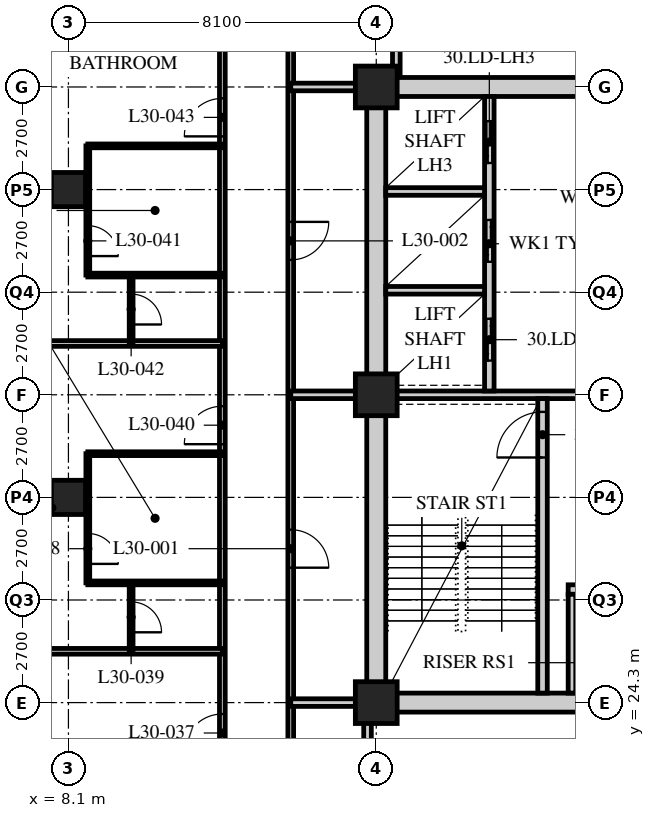
"""IFC4 building model, lengths in metres.
Left out: names, types, materials, properties, quantities, classifications, styles, units other than length and angle.
Written with IfcOpenShell. Run it as: python <this file> out.ifc"""

import sys

from ifc_helpers import new_model, si_unit, direction, frame, frame_2d, origin, origin_2d, place, context, subcontext, project, spatial, rectangle, hollow_rectangle, extrude, element, fill, save


model = new_model("IFC4")
c1 = context("Model", 3, precision=1e-05, world=origin(), true_north=direction((0.0, 1.0)))
c2 = subcontext(c1, "Body", "Model", "MODEL_VIEW")
j1 = project(units=[si_unit("LENGTHUNIT", "METRE"), si_unit("PLANEANGLEUNIT", "RADIAN")], contexts=[c1])
p1 = place(None, origin())
s1 = spatial("IfcSite", under=j1, at=p1, CompositionType="ELEMENT")
p2 = place(p1, origin())
s2 = spatial("IfcBuilding", under=s1, at=p2, CompositionType="ELEMENT")
p3 = place(p2, frame((0.0, 0.0, 120.4)))
s3 = spatial("IfcBuildingStorey", under=s2, at=p3, CompositionType="ELEMENT", Elevation=120.4)
for number, where, z_axis, x_axis in (
    (1, (8.1, 29.7, 0.0), (0.0, 0.0, 1.0), (1.0, 0.0, 0.0)),
    (2, (8.1, 37.8, 0.0), (0.0, 0.0, 1.0), (1.0, 0.0, 0.0)),
):
    element("IfcColumn", number, at=place(p3, frame(where, z_axis=z_axis, x_axis=x_axis)), inside=s3, PredefinedType="COLUMN", context=c2, shape_type="SweptSolid", body=[
        extrude(hollow_rectangle(XDim=0.9, YDim=0.9, WallThickness=0.09, at=origin_2d()), origin(), (0.0, 0.0, 1.0), 3.4),
    ])
for number, where, z_axis, x_axis in (
    (3, (16.2, 24.3, 0.0), (0.0, 0.0, 1.0), (1.0, 0.0, 0.0)),
    (4, (16.2, 32.4, 0.0), (0.0, 0.0, 1.0), (1.0, 0.0, 0.0)),
    (5, (16.2, 40.5, 0.0), (0.0, 0.0, 1.0), (1.0, 0.0, 0.0)),
):
    element("IfcColumn", number, at=place(p3, frame(where, z_axis=z_axis, x_axis=x_axis)), inside=s3, PredefinedType="COLUMN", context=c2, shape_type="SweptSolid", body=[
        extrude(hollow_rectangle(XDim=1.1, YDim=1.1, WallThickness=0.1, at=origin_2d()), origin(), (0.0, 0.0, 1.0), 3.4),
    ])
p4 = place(p3, frame((12.15, 17.55, 0.0), z_axis=(0.0, 0.0, 1.0), x_axis=(0.0, 1.0, 0.0)))
e6 = element("IfcWall", 6, at=p4, inside=s3, PredefinedType="PARTITIONING", context=c2, shape_type="SweptSolid", body=[
    extrude(rectangle(XDim=28.35, YDim=0.15, at=frame_2d((14.175, 0.0))), origin(), (0.0, 0.0, 1.0), 3.19),
])
p5 = place(p4, frame((5.45, 0.0, 0.0)))
e7 = element("IfcOpeningElement", 7, at=p5, cuts=e6, PredefinedType="OPENING", context=c2, shape_type="SweptSolid", body=[
    extrude(rectangle(XDim=1.0, YDim=2.1, at=frame_2d((0.5, 1.05))), frame((0.0, 0.085, 0.0), z_axis=(0.0, -1.0, 0.0), x_axis=(1.0, 0.0, 0.0)), (0.0, 0.0, 1.0), 0.17),
])
p6 = place(p4, frame((13.55, 0.0, 0.0)))
e8 = element("IfcOpeningElement", 8, at=p6, cuts=e6, PredefinedType="OPENING", context=c2, shape_type="SweptSolid", body=[
    extrude(rectangle(XDim=1.0, YDim=2.1, at=frame_2d((0.5, 1.05))), frame((0.0, 0.085, 0.0), z_axis=(0.0, -1.0, 0.0), x_axis=(1.0, 0.0, 0.0)), (0.0, 0.0, 1.0), 0.17),
])
p7 = place(p4, frame((21.65, 0.0, 0.0)))
e9 = element("IfcOpeningElement", 9, at=p7, cuts=e6, PredefinedType="OPENING", context=c2, shape_type="SweptSolid", body=[
    extrude(rectangle(XDim=1.0, YDim=2.1, at=frame_2d((0.5, 1.05))), frame((0.0, 0.085, 0.0), z_axis=(0.0, -1.0, 0.0), x_axis=(1.0, 0.0, 0.0)), (0.0, 0.0, 1.0), 0.17),
])
p8 = place(p4, frame((26.75, 0.0, 0.0)))
e10 = element("IfcOpeningElement", 10, at=p8, cuts=e6, PredefinedType="OPENING", context=c2, shape_type="SweptSolid", body=[
    extrude(rectangle(XDim=1.0, YDim=2.1, at=frame_2d((0.5, 1.05))), frame((0.0, 0.085, 0.0), z_axis=(0.0, -1.0, 0.0), x_axis=(1.0, 0.0, 0.0)), (0.0, 0.0, 1.0), 0.17),
])
p9 = place(p3, frame((13.95, 44.1, 0.0), z_axis=(0.0, 0.0, 1.0), x_axis=(0.0, -1.0, 0.0)))
e11 = element("IfcWall", 11, at=p9, inside=s3, PredefinedType="PARTITIONING", context=c2, shape_type="SweptSolid", body=[
    extrude(rectangle(XDim=24.75, YDim=0.15, at=frame_2d((12.375, 0.0))), origin(), (0.0, 0.0, 1.0), 3.19),
])
p10 = place(p9, frame((15.25, 0.0, 0.0)))
e12 = element("IfcOpeningElement", 12, at=p10, cuts=e11, PredefinedType="OPENING", context=c2, shape_type="SweptSolid", body=[
    extrude(rectangle(XDim=1.0, YDim=2.1, at=frame_2d((0.5, 1.05))), frame((0.0, 0.085, 0.0), z_axis=(0.0, -1.0, 0.0), x_axis=(1.0, 0.0, 0.0)), (0.0, 0.0, 1.0), 0.17),
])
p11 = place(p9, frame((7.15, 0.0, 0.0)))
e13 = element("IfcOpeningElement", 13, at=p11, cuts=e11, PredefinedType="OPENING", context=c2, shape_type="SweptSolid", body=[
    extrude(rectangle(XDim=1.0, YDim=2.1, at=frame_2d((0.5, 1.05))), frame((0.0, 0.085, 0.0), z_axis=(0.0, -1.0, 0.0), x_axis=(1.0, 0.0, 0.0)), (0.0, 0.0, 1.0), 0.17),
])
p12 = place(p3, frame((13.95, 32.4, 0.0), z_axis=(0.0, 0.0, 1.0), x_axis=(1.0, 0.0, 0.0)))
e14 = element("IfcWall", 14, at=p12, inside=s3, PredefinedType="SOLIDWALL", context=c2, shape_type="SweptSolid", body=[
    extrude(rectangle(XDim=2.25, YDim=0.2, at=frame_2d((1.125, 0.0))), origin(), (0.0, 0.0, 1.0), 3.19),
])
p13 = place(p3, frame((15.97, 19.35, 0.0), z_axis=(0.0, 0.0, 1.0), x_axis=(0.0, 1.0, 0.0)))
e15 = element("IfcWall", 15, at=p13, inside=s3, PredefinedType="SOLIDWALL", context=c2, shape_type="SweptSolid", body=[
    extrude(rectangle(XDim=4.95, YDim=0.2, at=frame_2d((2.475, 0.0))), origin(), (0.0, 0.0, 1.0), 2.49),
])
p14 = place(p3, frame((16.728, 44.1, 0.0), z_axis=(0.0, 0.0, 1.0), x_axis=(0.0, -1.0, 0.0)))
e16 = element("IfcWall", 16, at=p14, inside=s3, PredefinedType="SOLIDWALL", context=c2, shape_type="SweptSolid", body=[
    extrude(rectangle(XDim=3.6, YDim=0.2, at=frame_2d((1.8, 0.0))), origin(), (0.0, 0.0, 1.0), 3.19),
])
for number, where, z_axis, x_axis in (
    (17, (13.95, 24.3, 0.0), (0.0, 0.0, 1.0), (1.0, 0.0, 0.0)),
    (18, (13.95, 40.5, 0.0), (0.0, 0.0, 1.0), (1.0, 0.0, 0.0)),
):
    element("IfcWall", number, at=place(p3, frame(where, z_axis=z_axis, x_axis=x_axis)), inside=s3, PredefinedType="SOLIDWALL", context=c2, shape_type="SweptSolid", body=[
        extrude(rectangle(XDim=2.25, YDim=0.2, at=frame_2d((1.125, 0.0))), origin(), (0.0, 0.0, 1.0), 3.19),
    ])
p15 = place(p3, frame((12.15, 25.65, 0.0), z_axis=(0.0, 0.0, 1.0), x_axis=(-1.0, 0.0, 0.0)))
e19 = element("IfcWall", 19, at=p15, inside=s3, PredefinedType="PARTITIONING", context=c2, shape_type="SweptSolid", body=[
    extrude(rectangle(XDim=11.85, YDim=0.15, at=frame_2d((5.925, 0.0))), origin(), (0.0, 0.0, 1.0), 3.19),
])
p16 = place(p3, frame((8.61, 27.45, 0.0), z_axis=(0.0, 0.0, 1.0), x_axis=(0.0, 1.0, 0.0)))
e20 = element("IfcWall", 20, at=p16, inside=s3, PredefinedType="PARTITIONING", context=c2, shape_type="SweptSolid", body=[
    extrude(rectangle(XDim=3.4, YDim=0.1, at=frame_2d((1.7, 0.0))), origin(), (0.0, 0.0, 1.0), 3.19),
])
p17 = place(p16, frame((0.5, 0.0, 0.0)))
e21 = element("IfcOpeningElement", 21, at=p17, cuts=e20, PredefinedType="OPENING", context=c2, shape_type="SweptSolid", body=[
    extrude(rectangle(XDim=0.8, YDim=2.1, at=frame_2d((0.4, 1.05))), frame((0.0, 0.06, 0.0), z_axis=(0.0, -1.0, 0.0), x_axis=(1.0, 0.0, 0.0)), (0.0, 0.0, 1.0), 0.12),
])
p18 = place(p3, frame((9.75, 25.65, 0.0), z_axis=(0.0, 0.0, 1.0), x_axis=(0.0, 1.0, 0.0)))
e22 = element("IfcWall", 22, at=p18, inside=s3, PredefinedType="PARTITIONING", context=c2, shape_type="SweptSolid", body=[
    extrude(rectangle(XDim=1.8, YDim=0.1, at=frame_2d((0.9, 0.0))), origin(), (0.0, 0.0, 1.0), 3.19),
])
p19 = place(p18, frame((0.5, 0.0, 0.0)))
e23 = element("IfcOpeningElement", 23, at=p19, cuts=e22, PredefinedType="OPENING", context=c2, shape_type="SweptSolid", body=[
    extrude(rectangle(XDim=0.8, YDim=2.1, at=frame_2d((0.4, 1.05))), frame((0.0, 0.06, 0.0), z_axis=(0.0, -1.0, 0.0), x_axis=(1.0, 0.0, 0.0)), (0.0, 0.0, 1.0), 0.12),
])
for number, where, z_axis, x_axis in (
    (24, (12.15, 27.45, 0.0), (0.0, 0.0, 1.0), (-1.0, 0.0, 0.0)),
    (25, (12.15, 30.85, 0.0), (0.0, 0.0, 1.0), (-1.0, 0.0, 0.0)),
):
    element("IfcWall", number, at=place(p3, frame(where, z_axis=z_axis, x_axis=x_axis)), inside=s3, PredefinedType="PARTITIONING", context=c2, shape_type="SweptSolid", body=[
        extrude(rectangle(XDim=3.54, YDim=0.1, at=frame_2d((1.77, 0.0))), origin(), (0.0, 0.0, 1.0), 3.19),
    ])
p20 = place(p3, frame((12.15, 33.75, 0.0), z_axis=(0.0, 0.0, 1.0), x_axis=(-1.0, 0.0, 0.0)))
e26 = element("IfcWall", 26, at=p20, inside=s3, PredefinedType="PARTITIONING", context=c2, shape_type="SweptSolid", body=[
    extrude(rectangle(XDim=11.85, YDim=0.15, at=frame_2d((5.925, 0.0))), origin(), (0.0, 0.0, 1.0), 3.19),
])
p21 = place(p3, frame((8.61, 35.55, 0.0), z_axis=(0.0, 0.0, 1.0), x_axis=(0.0, 1.0, 0.0)))
e27 = element("IfcWall", 27, at=p21, inside=s3, PredefinedType="PARTITIONING", context=c2, shape_type="SweptSolid", body=[
    extrude(rectangle(XDim=3.4, YDim=0.1, at=frame_2d((1.7, 0.0))), origin(), (0.0, 0.0, 1.0), 3.19),
])
p22 = place(p21, frame((0.5, 0.0, 0.0)))
e28 = element("IfcOpeningElement", 28, at=p22, cuts=e27, PredefinedType="OPENING", context=c2, shape_type="SweptSolid", body=[
    extrude(rectangle(XDim=0.8, YDim=2.1, at=frame_2d((0.4, 1.05))), frame((0.0, 0.06, 0.0), z_axis=(0.0, -1.0, 0.0), x_axis=(1.0, 0.0, 0.0)), (0.0, 0.0, 1.0), 0.12),
])
p23 = place(p3, frame((9.75, 33.75, 0.0), z_axis=(0.0, 0.0, 1.0), x_axis=(0.0, 1.0, 0.0)))
e29 = element("IfcWall", 29, at=p23, inside=s3, PredefinedType="PARTITIONING", context=c2, shape_type="SweptSolid", body=[
    extrude(rectangle(XDim=1.8, YDim=0.1, at=frame_2d((0.9, 0.0))), origin(), (0.0, 0.0, 1.0), 3.19),
])
p24 = place(p23, frame((0.5, 0.0, 0.0)))
e30 = element("IfcOpeningElement", 30, at=p24, cuts=e29, PredefinedType="OPENING", context=c2, shape_type="SweptSolid", body=[
    extrude(rectangle(XDim=0.8, YDim=2.1, at=frame_2d((0.4, 1.05))), frame((0.0, 0.06, 0.0), z_axis=(0.0, -1.0, 0.0), x_axis=(1.0, 0.0, 0.0)), (0.0, 0.0, 1.0), 0.12),
])
for number, where, z_axis, x_axis in (
    (31, (12.15, 35.55, 0.0), (0.0, 0.0, 1.0), (-1.0, 0.0, 0.0)),
    (32, (12.15, 38.95, 0.0), (0.0, 0.0, 1.0), (-1.0, 0.0, 0.0)),
):
    element("IfcWall", number, at=place(p3, frame(where, z_axis=z_axis, x_axis=x_axis)), inside=s3, PredefinedType="PARTITIONING", context=c2, shape_type="SweptSolid", body=[
        extrude(rectangle(XDim=3.54, YDim=0.1, at=frame_2d((1.77, 0.0))), origin(), (0.0, 0.0, 1.0), 3.19),
    ])
p25 = place(p3, frame((15.95, 24.3, 0.0), z_axis=(0.0, 0.0, 1.0), x_axis=(1.0, 0.0, 0.0)))
e33 = element("IfcWall", 33, at=p25, inside=s3, PredefinedType="SOLIDWALL", context=c2, shape_type="SweptSolid", body=[
    extrude(rectangle(XDim=24.8, YDim=0.5, at=frame_2d((12.4, 0.0))), origin(), (0.0, 0.0, 1.0), 2.54),
])
p26 = place(p25, frame((11.5, 0.0, 0.0)))
e34 = element("IfcOpeningElement", 34, at=p26, cuts=e33, PredefinedType="OPENING", context=c2, shape_type="SweptSolid", body=[
    extrude(rectangle(XDim=1.8, YDim=2.4, at=frame_2d((0.9, 1.2))), frame((0.0, 0.26, 0.0), z_axis=(0.0, -1.0, 0.0), x_axis=(1.0, 0.0, 0.0)), (0.0, 0.0, 1.0), 0.52),
])
p27 = place(p3, frame((15.95, 40.5, 0.0), z_axis=(0.0, 0.0, 1.0), x_axis=(1.0, 0.0, 0.0)))
e35 = element("IfcWall", 35, at=p27, inside=s3, PredefinedType="SOLIDWALL", context=c2, shape_type="SweptSolid", body=[
    extrude(rectangle(XDim=24.8, YDim=0.5, at=frame_2d((12.4, 0.0))), origin(), (0.0, 0.0, 1.0), 2.54),
])
p28 = place(p27, frame((11.5, 0.0, 0.0)))
e36 = element("IfcOpeningElement", 36, at=p28, cuts=e35, PredefinedType="OPENING", context=c2, shape_type="SweptSolid", body=[
    extrude(rectangle(XDim=1.8, YDim=2.4, at=frame_2d((0.9, 1.2))), frame((0.0, 0.26, 0.0), z_axis=(0.0, -1.0, 0.0), x_axis=(1.0, 0.0, 0.0)), (0.0, 0.0, 1.0), 0.52),
])
p29 = place(p3, frame((16.2, 24.55, 0.0), z_axis=(0.0, 0.0, 1.0), x_axis=(0.0, 1.0, 0.0)))
e37 = element("IfcWall", 37, at=p29, inside=s3, PredefinedType="SOLIDWALL", context=c2, shape_type="SweptSolid", body=[
    extrude(rectangle(XDim=15.7, YDim=0.5, at=frame_2d((7.85, 0.0))), origin(), (0.0, 0.0, 1.0), 2.578),
])
p30 = place(p3, frame((16.45, 32.4, 0.0), z_axis=(0.0, 0.0, 1.0), x_axis=(1.0, 0.0, 0.0)))
e38 = element("IfcWall", 38, at=p30, inside=s3, PredefinedType="SOLIDWALL", context=c2, shape_type="SweptSolid", body=[
    extrude(rectangle(XDim=7.95, YDim=0.2, at=frame_2d((3.975, 0.0))), origin(), (0.0, 0.0, 1.0), 2.578),
])
p31 = place(p3, frame((20.575, 24.55, 0.0), z_axis=(0.0, 0.0, 1.0), x_axis=(0.0, 1.0, 0.0)))
e39 = element("IfcWall", 39, at=p31, inside=s3, PredefinedType="SOLIDWALL", context=c2, shape_type="SweptSolid", body=[
    extrude(rectangle(XDim=7.75, YDim=0.25, at=frame_2d((3.875, 0.0))), origin(), (0.0, 0.0, 1.0), 3.19),
])
p32 = place(p31, frame((6.2, 0.0, 0.0)))
e40 = element("IfcOpeningElement", 40, at=p32, cuts=e39, PredefinedType="OPENING", context=c2, shape_type="SweptSolid", body=[
    extrude(rectangle(XDim=1.2, YDim=2.1, at=frame_2d((0.6, 1.05))), frame((0.0, 0.135, 0.0), z_axis=(0.0, -1.0, 0.0), x_axis=(1.0, 0.0, 0.0)), (0.0, 0.0, 1.0), 0.27),
])
p33 = place(p3, frame((21.25, 27.275, 0.0), z_axis=(0.0, 0.0, 1.0), x_axis=(1.0, 0.0, 0.0)))
e41 = element("IfcWall", 41, at=p33, inside=s3, PredefinedType="SOLIDWALL", context=c2, shape_type="SweptSolid", body=[
    extrude(rectangle(XDim=2.95, YDim=0.25, at=frame_2d((1.475, 0.0))), origin(), (0.0, 0.0, 1.0), 3.19),
])
p34 = place(p33, frame((0.95, 0.0, 0.0)))
e42 = element("IfcOpeningElement", 42, at=p34, cuts=e41, PredefinedType="OPENING", context=c2, shape_type="SweptSolid", body=[
    extrude(rectangle(XDim=1.1, YDim=2.4, at=frame_2d((0.55, 1.2))), frame((0.0, 0.135, 0.0), z_axis=(0.0, -1.0, 0.0), x_axis=(1.0, 0.0, 0.0)), (0.0, 0.0, 1.0), 0.27),
])
p35 = place(p3, frame((21.35, 24.55, 0.0), z_axis=(0.0, 0.0, 1.0), x_axis=(0.0, 1.0, 0.0)))
e43 = element("IfcWall", 43, at=p35, inside=s3, PredefinedType="SOLIDWALL", context=c2, shape_type="SweptSolid", body=[
    extrude(rectangle(XDim=2.6, YDim=0.2, at=frame_2d((1.3, 0.0))), origin(), (0.0, 0.0, 1.0), 3.19),
])
p36 = place(p3, frame((19.175, 32.5, 0.0), z_axis=(0.0, 0.0, 1.0), x_axis=(0.0, 1.0, 0.0)))
e44 = element("IfcWall", 44, at=p36, inside=s3, PredefinedType="SOLIDWALL", context=c2, shape_type="SweptSolid", body=[
    extrude(rectangle(XDim=7.75, YDim=0.25, at=frame_2d((3.875, 0.0))), origin(), (0.0, 0.0, 1.0), 3.19),
])
p37 = place(p36, frame((0.8, 0.0, 0.0)))
e45 = element("IfcOpeningElement", 45, at=p37, cuts=e44, PredefinedType="OPENING", context=c2, shape_type="SweptSolid", body=[
    extrude(rectangle(XDim=1.1, YDim=2.4, at=frame_2d((0.55, 1.2))), frame((0.0, 0.135, 0.0), z_axis=(0.0, -1.0, 0.0), x_axis=(1.0, 0.0, 0.0)), (0.0, 0.0, 1.0), 0.27),
])
p38 = place(p36, frame((3.4, 0.0, 0.0)))
e46 = element("IfcOpeningElement", 46, at=p38, cuts=e44, PredefinedType="OPENING", context=c2, shape_type="SweptSolid", body=[
    extrude(rectangle(XDim=1.1, YDim=2.4, at=frame_2d((0.55, 1.2))), frame((0.0, 0.135, 0.0), z_axis=(0.0, -1.0, 0.0), x_axis=(1.0, 0.0, 0.0)), (0.0, 0.0, 1.0), 0.27),
])
p39 = place(p36, frame((6.0, 0.0, 0.0)))
e47 = element("IfcOpeningElement", 47, at=p39, cuts=e44, PredefinedType="OPENING", context=c2, shape_type="SweptSolid", body=[
    extrude(rectangle(XDim=1.1, YDim=2.4, at=frame_2d((0.55, 1.2))), frame((0.0, 0.135, 0.0), z_axis=(0.0, -1.0, 0.0), x_axis=(1.0, 0.0, 0.0)), (0.0, 0.0, 1.0), 0.27),
])
for number, where, z_axis, x_axis in (
    (48, (16.45, 35.15, 0.0), (0.0, 0.0, 1.0), (1.0, 0.0, 0.0)),
    (49, (16.45, 37.75, 0.0), (0.0, 0.0, 1.0), (1.0, 0.0, 0.0)),
):
    element("IfcWall", number, at=place(p3, frame(where, z_axis=z_axis, x_axis=x_axis)), inside=s3, PredefinedType="SOLIDWALL", context=c2, shape_type="SweptSolid", body=[
        extrude(rectangle(XDim=2.6, YDim=0.2, at=frame_2d((1.3, 0.0))), origin(), (0.0, 0.0, 1.0), 3.19),
    ])
p40 = place(p10, origin())
e50 = element("IfcDoor", 50, at=p40, inside=s3, OperationType="SINGLE_SWING_RIGHT", PredefinedType="DOOR", context=c2, shape_type="SweptSolid", body=[
    extrude(rectangle(XDim=1.0, YDim=2.1, at=frame_2d((0.5, 1.05))), frame((0.0, 0.025, 0.0), z_axis=(0.0, -1.0, 0.0), x_axis=(1.0, 0.0, 0.0)), (0.0, 0.0, 1.0), 0.05),
])
fill(e12, e50)
p41 = place(p11, origin())
e51 = element("IfcDoor", 51, at=p41, inside=s3, OperationType="SINGLE_SWING_LEFT", PredefinedType="DOOR", context=c2, shape_type="SweptSolid", body=[
    extrude(rectangle(XDim=1.0, YDim=2.1, at=frame_2d((0.5, 1.05))), frame((0.0, 0.025, 0.0), z_axis=(0.0, -1.0, 0.0), x_axis=(1.0, 0.0, 0.0)), (0.0, 0.0, 1.0), 0.05),
])
fill(e13, e51)
p42 = place(p5, origin())
e52 = element("IfcDoor", 52, at=p42, inside=s3, OperationType="SINGLE_SWING_LEFT", PredefinedType="DOOR", context=c2, shape_type="SweptSolid", body=[
    extrude(rectangle(XDim=1.0, YDim=2.1, at=frame_2d((0.5, 1.05))), frame((0.0, 0.025, 0.0), z_axis=(0.0, -1.0, 0.0), x_axis=(1.0, 0.0, 0.0)), (0.0, 0.0, 1.0), 0.05),
])
fill(e7, e52)
p43 = place(p17, origin())
e53 = element("IfcDoor", 53, at=p43, inside=s3, OperationType="SINGLE_SWING_RIGHT", PredefinedType="DOOR", context=c2, shape_type="SweptSolid", body=[
    extrude(rectangle(XDim=0.8, YDim=2.1, at=frame_2d((0.4, 1.05))), frame((0.0, 0.025, 0.0), z_axis=(0.0, -1.0, 0.0), x_axis=(1.0, 0.0, 0.0)), (0.0, 0.0, 1.0), 0.05),
])
fill(e21, e53)
p44 = place(p19, origin())
e54 = element("IfcDoor", 54, at=p44, inside=s3, OperationType="SINGLE_SWING_RIGHT", PredefinedType="DOOR", context=c2, shape_type="SweptSolid", body=[
    extrude(rectangle(XDim=0.8, YDim=2.1, at=frame_2d((0.4, 1.05))), frame((0.0, 0.025, 0.0), z_axis=(0.0, -1.0, 0.0), x_axis=(1.0, 0.0, 0.0)), (0.0, 0.0, 1.0), 0.05),
])
fill(e23, e54)
p45 = place(p6, origin())
e55 = element("IfcDoor", 55, at=p45, inside=s3, OperationType="SINGLE_SWING_LEFT", PredefinedType="DOOR", context=c2, shape_type="SweptSolid", body=[
    extrude(rectangle(XDim=1.0, YDim=2.1, at=frame_2d((0.5, 1.05))), frame((0.0, 0.025, 0.0), z_axis=(0.0, -1.0, 0.0), x_axis=(1.0, 0.0, 0.0)), (0.0, 0.0, 1.0), 0.05),
])
fill(e8, e55)
p46 = place(p22, origin())
e56 = element("IfcDoor", 56, at=p46, inside=s3, OperationType="SINGLE_SWING_RIGHT", PredefinedType="DOOR", context=c2, shape_type="SweptSolid", body=[
    extrude(rectangle(XDim=0.8, YDim=2.1, at=frame_2d((0.4, 1.05))), frame((0.0, 0.025, 0.0), z_axis=(0.0, -1.0, 0.0), x_axis=(1.0, 0.0, 0.0)), (0.0, 0.0, 1.0), 0.05),
])
fill(e28, e56)
p47 = place(p24, origin())
e57 = element("IfcDoor", 57, at=p47, inside=s3, OperationType="SINGLE_SWING_RIGHT", PredefinedType="DOOR", context=c2, shape_type="SweptSolid", body=[
    extrude(rectangle(XDim=0.8, YDim=2.1, at=frame_2d((0.4, 1.05))), frame((0.0, 0.025, 0.0), z_axis=(0.0, -1.0, 0.0), x_axis=(1.0, 0.0, 0.0)), (0.0, 0.0, 1.0), 0.05),
])
fill(e30, e57)
p48 = place(p7, origin())
e58 = element("IfcDoor", 58, at=p48, inside=s3, OperationType="SINGLE_SWING_LEFT", PredefinedType="DOOR", context=c2, shape_type="SweptSolid", body=[
    extrude(rectangle(XDim=1.0, YDim=2.1, at=frame_2d((0.5, 1.05))), frame((0.0, 0.025, 0.0), z_axis=(0.0, -1.0, 0.0), x_axis=(1.0, 0.0, 0.0)), (0.0, 0.0, 1.0), 0.05),
])
fill(e9, e58)
p49 = place(p32, origin())
e59 = element("IfcDoor", 59, at=p49, inside=s3, OperationType="SINGLE_SWING_LEFT", PredefinedType="DOOR", context=c2, shape_type="SweptSolid", body=[
    extrude(rectangle(XDim=1.2, YDim=2.1, at=frame_2d((0.6, 1.05))), frame((0.0, 0.025, 0.0), z_axis=(0.0, -1.0, 0.0), x_axis=(1.0, 0.0, 0.0)), (0.0, 0.0, 1.0), 0.05),
])
fill(e40, e59)
p50 = place(p37, origin())
e60 = element("IfcDoor", 60, at=p50, inside=s3, OperationType="DOUBLE_DOOR_SLIDING", PredefinedType="DOOR", context=c2, shape_type="SweptSolid", body=[
    extrude(rectangle(XDim=1.1, YDim=2.4, at=frame_2d((0.55, 1.2))), frame((0.0, 0.025, 0.0), z_axis=(0.0, -1.0, 0.0), x_axis=(1.0, 0.0, 0.0)), (0.0, 0.0, 1.0), 0.05),
])
fill(e45, e60)
p51 = place(p38, origin())
e61 = element("IfcDoor", 61, at=p51, inside=s3, OperationType="DOUBLE_DOOR_SLIDING", PredefinedType="DOOR", context=c2, shape_type="SweptSolid", body=[
    extrude(rectangle(XDim=1.1, YDim=2.4, at=frame_2d((0.55, 1.2))), frame((0.0, 0.025, 0.0), z_axis=(0.0, -1.0, 0.0), x_axis=(1.0, 0.0, 0.0)), (0.0, 0.0, 1.0), 0.05),
])
fill(e46, e61)
p52 = place(p39, origin())
e62 = element("IfcDoor", 62, at=p52, inside=s3, OperationType="DOUBLE_DOOR_SLIDING", PredefinedType="DOOR", context=c2, shape_type="SweptSolid", body=[
    extrude(rectangle(XDim=1.1, YDim=2.4, at=frame_2d((0.55, 1.2))), frame((0.0, 0.025, 0.0), z_axis=(0.0, -1.0, 0.0), x_axis=(1.0, 0.0, 0.0)), (0.0, 0.0, 1.0), 0.05),
])
fill(e47, e62)
save(model, sys.argv[1])
